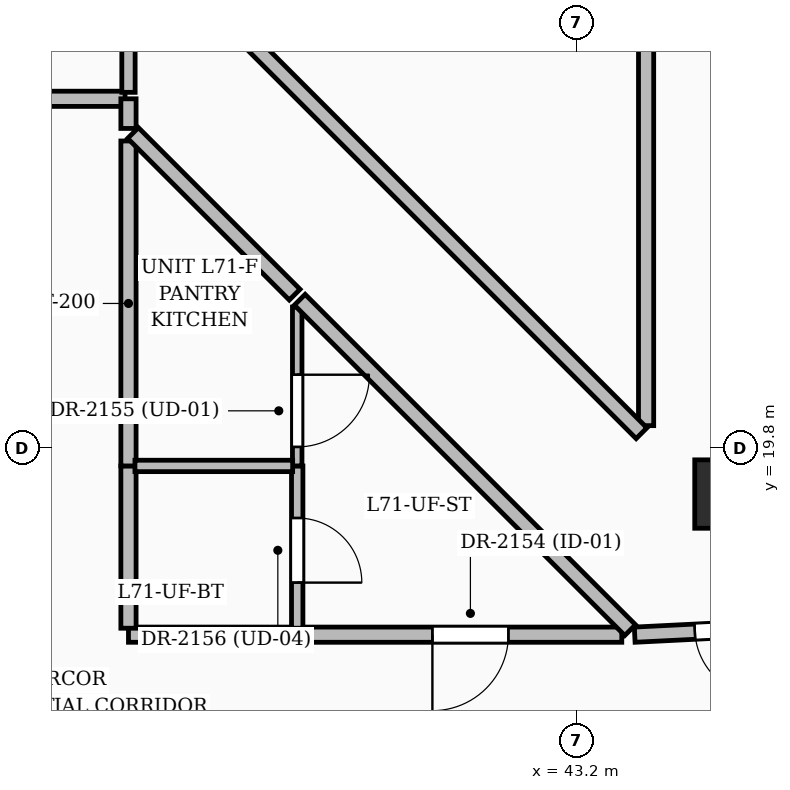
"""IFC4 building model, lengths in metres.
Left out: names, types, materials, properties, quantities, classifications, styles, units other than length and angle.
Written with IfcOpenShell. Run it as: python <this file> out.ifc"""

import sys

from ifc_helpers import new_model, si_unit, direction, frame, frame_2d, origin, origin_2d, place, context, subcontext, project, spatial, rectangle, extrude, element, fill, save


model = new_model("IFC4")
c1 = context("Model", 3, precision=1e-05, world=origin(), true_north=direction((0.0, 1.0)))
c2 = subcontext(c1, "Body", "Model", "MODEL_VIEW")
j1 = project(units=[si_unit("LENGTHUNIT", "METRE"), si_unit("PLANEANGLEUNIT", "RADIAN")], contexts=[c1])
p1 = place(None, origin())
s1 = spatial("IfcSite", under=j1, at=p1, CompositionType="ELEMENT")
p2 = place(p1, origin())
s2 = spatial("IfcBuilding", under=s1, at=p2, CompositionType="ELEMENT")
p3 = place(p2, frame((0.0, 0.0, 274.5)))
s3 = spatial("IfcBuildingStorey", under=s2, at=p3, CompositionType="ELEMENT", Elevation=274.5)
p4 = place(p3, frame((45.2, 19.2, 0.0), z_axis=(0.0, 0.0, 1.0), x_axis=(1.0, 0.0, 0.0)))
e1 = element("IfcColumn", 1, at=p4, inside=s3, PredefinedType="COLUMN", context=c2, shape_type="SweptSolid", body=[
    extrude(rectangle(XDim=0.9, YDim=0.9, at=origin_2d()), origin(), (0.0, 0.0, 1.0), 3.75),
])
p5 = place(p3, frame((44.178, 29.5, 0.0), z_axis=(0.0, 0.0, 1.0), x_axis=(0.441250379224, -0.897384033084, 0.0)))
e2 = element("IfcWall", 2, at=p5, inside=s3, PredefinedType="SOLIDWALL", context=c2, shape_type="SweptSolid", body=[
    extrude(rectangle(XDim=5.676, YDim=0.3, at=frame_2d((2.838, 0.0))), origin(), (0.0, 0.0, 1.0), 3.5),
])
p6 = place(p5, frame((2.298, 0.0, 0.0)))
e3 = element("IfcOpeningElement", 3, at=p6, cuts=e2, PredefinedType="OPENING", context=c2, shape_type="SweptSolid", body=[
    extrude(rectangle(XDim=1.0, YDim=2.2, at=frame_2d((0.5, 1.1))), frame((0.0, 0.16, 0.0), z_axis=(0.0, -1.0, 0.0), x_axis=(1.0, 0.0, 0.0)), (0.0, 0.0, 1.0), 0.32),
])
p7 = place(p3, frame((43.79, 17.35, 0.0), z_axis=(0.0, 0.0, 1.0), x_axis=(-1.0, 0.0, 0.0)))
e4 = element("IfcWall", 4, at=p7, inside=s3, PredefinedType="PARTITIONING", context=c2, shape_type="SweptSolid", body=[
    extrude(rectangle(XDim=4.27, YDim=0.2, at=frame_2d((2.135, 0.0))), origin(), (0.0, 0.0, 1.0), 3.5),
])
p8 = place(p7, frame((1.491, 0.0, 0.0)))
e5 = element("IfcOpeningElement", 5, at=p8, cuts=e4, PredefinedType="OPENING", context=c2, shape_type="SweptSolid", body=[
    extrude(rectangle(XDim=1.0, YDim=2.2, at=frame_2d((0.5, 1.1))), frame((0.0, 0.11, 0.0), z_axis=(0.0, -1.0, 0.0), x_axis=(1.0, 0.0, 0.0)), (0.0, 0.0, 1.0), 0.22),
])
p9 = place(p3, frame((39.52, 17.35, 0.0), z_axis=(0.0, 0.0, 1.0), x_axis=(-1.0, 0.0, 0.0)))
e6 = element("IfcWall", 6, at=p9, inside=s3, PredefinedType="PARTITIONING", context=c2, shape_type="SweptSolid", body=[
    extrude(rectangle(XDim=2.22, YDim=0.2, at=frame_2d((1.11, 0.0))), origin(), (0.0, 0.0, 1.0), 3.5),
])
p10 = place(p3, frame((37.3, 17.435, 0.0), z_axis=(0.0, 0.0, 1.0), x_axis=(0.0, 1.0, 0.0)))
e7 = element("IfcWall", 7, at=p10, inside=s3, PredefinedType="PARTITIONING", context=c2, shape_type="SweptSolid", body=[
    extrude(rectangle(XDim=2.135, YDim=0.2, at=frame_2d((1.067, 0.0))), origin(), (0.0, 0.0, 1.0), 3.5),
])
p11 = place(p3, frame((37.3, 19.57, 0.0), z_axis=(0.0, 0.0, 1.0), x_axis=(0.0, 1.0, 0.0)))
e8 = element("IfcWall", 8, at=p11, inside=s3, PredefinedType="PARTITIONING", context=c2, shape_type="SweptSolid", body=[
    extrude(rectangle(XDim=4.275, YDim=0.2, at=frame_2d((2.137, 0.0))), origin(), (0.0, 0.0, 1.0), 3.5),
])
p12 = place(p3, frame((37.255, 24.4, 0.0), z_axis=(0.0, 0.0, 1.0), x_axis=(-1.0, 0.0, 0.0)))
e9 = element("IfcWall", 9, at=p12, inside=s3, PredefinedType="PARTITIONING", context=c2, shape_type="SweptSolid", body=[
    extrude(rectangle(XDim=1.905, YDim=0.2, at=frame_2d((0.952, 0.0))), origin(), (0.0, 0.0, 1.0), 2.685),
])
p13 = place(p3, frame((37.3, 24.01, 0.0), z_axis=(0.0, 0.0, 1.0), x_axis=(0.0, 1.0, 0.0)))
e10 = element("IfcWall", 10, at=p13, inside=s3, PredefinedType="PARTITIONING", context=c2, shape_type="SweptSolid", body=[
    extrude(rectangle(XDim=0.39, YDim=0.2, at=frame_2d((0.195, 0.0))), origin(), (0.0, 0.0, 1.0), 3.5),
])
p14 = place(p3, frame((47.41, 17.522, 0.0), z_axis=(0.0, 0.0, 1.0), x_axis=(-0.998761311764, -0.049757834795, 0.0)))
e11 = element("IfcWall", 11, at=p14, inside=s3, PredefinedType="PARTITIONING", context=c2, shape_type="SweptSolid", body=[
    extrude(rectangle(XDim=3.454, YDim=0.2, at=frame_2d((1.727, 0.0))), origin(), (0.0, 0.0, 1.0), 2.685),
])
p15 = place(p14, frame((1.762, 0.0, 0.0)))
e12 = element("IfcOpeningElement", 12, at=p15, cuts=e11, PredefinedType="OPENING", context=c2, shape_type="SweptSolid", body=[
    extrude(rectangle(XDim=0.9, YDim=2.1, at=frame_2d((0.45, 1.05))), frame((0.0, 0.11, 0.0), z_axis=(0.0, -1.0, 0.0), x_axis=(1.0, 0.0, 0.0)), (0.0, 0.0, 1.0), 0.22),
])
p16 = place(p3, frame((39.52, 19.57, 0.0), z_axis=(0.0, 0.0, 1.0), x_axis=(0.0, -1.0, 0.0)))
e13 = element("IfcWall", 13, at=p16, inside=s3, PredefinedType="PARTITIONING", context=c2, shape_type="SweptSolid", body=[
    extrude(rectangle(XDim=2.135, YDim=0.15, at=frame_2d((1.067, 0.0))), origin(), (0.0, 0.0, 1.0), 3.5),
])
p17 = place(p16, frame((0.685, 0.0, 0.0)))
e14 = element("IfcOpeningElement", 14, at=p17, cuts=e13, PredefinedType="OPENING", context=c2, shape_type="SweptSolid", body=[
    extrude(rectangle(XDim=0.85, YDim=2.1, at=frame_2d((0.425, 1.05))), frame((0.0, 0.085, 0.0), z_axis=(0.0, -1.0, 0.0), x_axis=(1.0, 0.0, 0.0)), (0.0, 0.0, 1.0), 0.17),
])
p18 = place(p3, frame((39.52, 21.66, 0.0), z_axis=(0.0, 0.0, 1.0), x_axis=(0.0, -1.0, 0.0)))
e15 = element("IfcWall", 15, at=p18, inside=s3, PredefinedType="PARTITIONING", context=c2, shape_type="SweptSolid", body=[
    extrude(rectangle(XDim=2.09, YDim=0.125, at=frame_2d((1.045, 0.0))), origin(), (0.0, 0.0, 1.0), 3.5),
])
p19 = place(p18, frame((0.89, 0.0, 0.0)))
e16 = element("IfcOpeningElement", 16, at=p19, cuts=e15, PredefinedType="OPENING", context=c2, shape_type="SweptSolid", body=[
    extrude(rectangle(XDim=0.95, YDim=2.2, at=frame_2d((0.475, 1.1))), frame((0.0, 0.072, 0.0), z_axis=(0.0, -1.0, 0.0), x_axis=(1.0, 0.0, 0.0)), (0.0, 0.0, 1.0), 0.145),
])
p20 = place(p3, frame((43.9, 17.41, 0.0), z_axis=(0.0, 0.0, 1.0), x_axis=(-0.707106781187, 0.707106781187, 0.0)))
e17 = element("IfcWall", 17, at=p20, inside=s3, PredefinedType="PARTITIONING", context=c2, shape_type="SweptSolid", body=[
    extrude(rectangle(XDim=6.146, YDim=0.2, at=frame_2d((3.073, 0.0))), origin(), (0.0, 0.0, 1.0), 3.5),
])
p21 = place(p3, frame((39.46, 19.57, 0.0), z_axis=(0.0, 0.0, 1.0), x_axis=(-1.0, 0.0, 0.0)))
e18 = element("IfcWall", 18, at=p21, inside=s3, PredefinedType="PARTITIONING", context=c2, shape_type="SweptSolid", body=[
    extrude(rectangle(XDim=2.075, YDim=0.15, at=frame_2d((1.038, 0.0))), origin(), (0.0, 0.0, 1.0), 3.5),
])
p22 = place(p3, frame((39.486, 21.823, 0.0), z_axis=(0.0, 0.0, 1.0), x_axis=(-0.707066186027, 0.707147374015, 0.0)))
e19 = element("IfcWall", 19, at=p22, inside=s3, PredefinedType="PARTITIONING", context=c2, shape_type="SweptSolid", body=[
    extrude(rectangle(XDim=3.007, YDim=0.2, at=frame_2d((1.503, 0.0))), origin(), (0.0, 0.0, 1.0), 3.5),
])
p23 = place(p3, frame((44.11, 25.98, 0.0), z_axis=(0.0, 0.0, 1.0), x_axis=(0.0, -1.0, 0.0)))
e20 = element("IfcWall", 20, at=p23, inside=s3, PredefinedType="PARTITIONING", context=c2, shape_type="SweptSolid", body=[
    extrude(rectangle(XDim=5.88, YDim=0.2, at=frame_2d((2.94, 0.0))), origin(), (0.0, 0.0, 1.0), 2.685),
])
p24 = place(p3, frame((37.3, 24.485, 0.0), z_axis=(0.0, 0.0, 1.0), x_axis=(0.0, 1.0, 0.0)))
e21 = element("IfcWall", 21, at=p24, inside=s3, PredefinedType="PARTITIONING", context=c2, shape_type="SweptSolid", body=[
    extrude(rectangle(XDim=2.115, YDim=0.175, at=frame_2d((1.058, 0.0))), origin(), (0.0, 0.0, 1.0), 2.685),
])
p25 = place(p3, frame((44.05, 20.0, 0.0), z_axis=(0.0, 0.0, 1.0), x_axis=(-0.707093895296, 0.707119666842, 0.0)))
e22 = element("IfcWall", 22, at=p25, inside=s3, PredefinedType="PARTITIONING", context=c2, shape_type="SweptSolid", body=[
    extrude(rectangle(XDim=9.473, YDim=0.2, at=frame_2d((4.737, 0.0))), origin(), (0.0, 0.0, 1.0), 2.685),
])
p26 = place(p15, origin())
e23 = element("IfcDoor", 23, at=p26, inside=s3, OperationType="SINGLE_SWING_LEFT", PredefinedType="DOOR", context=c2, shape_type="SweptSolid", body=[
    extrude(rectangle(XDim=0.9, YDim=2.1, at=frame_2d((0.45, 1.05))), frame((0.0, 0.025, 0.0), z_axis=(0.0, -1.0, 0.0), x_axis=(1.0, 0.0, 0.0)), (0.0, 0.0, 1.0), 0.05),
])
fill(e12, e23)
p27 = place(p8, origin())
e24 = element("IfcDoor", 24, at=p27, inside=s3, OperationType="SINGLE_SWING_RIGHT", PredefinedType="DOOR", context=c2, shape_type="SweptSolid", body=[
    extrude(rectangle(XDim=1.0, YDim=2.2, at=frame_2d((0.5, 1.1))), frame((0.0, 0.025, 0.0), z_axis=(0.0, -1.0, 0.0), x_axis=(1.0, 0.0, 0.0)), (0.0, 0.0, 1.0), 0.05),
])
fill(e5, e24)
p28 = place(p19, origin())
e25 = element("IfcDoor", 25, at=p28, inside=s3, OperationType="SINGLE_SWING_LEFT", PredefinedType="DOOR", context=c2, shape_type="SweptSolid", body=[
    extrude(rectangle(XDim=0.95, YDim=2.2, at=frame_2d((0.475, 1.1))), frame((0.0, 0.025, 0.0), z_axis=(0.0, -1.0, 0.0), x_axis=(1.0, 0.0, 0.0)), (0.0, 0.0, 1.0), 0.05),
])
fill(e16, e25)
p29 = place(p17, origin())
e26 = element("IfcDoor", 26, at=p29, inside=s3, OperationType="SINGLE_SWING_RIGHT", PredefinedType="DOOR", context=c2, shape_type="SweptSolid", body=[
    extrude(rectangle(XDim=0.85, YDim=2.1, at=frame_2d((0.425, 1.05))), frame((0.0, 0.025, 0.0), z_axis=(0.0, -1.0, 0.0), x_axis=(1.0, 0.0, 0.0)), (0.0, 0.0, 1.0), 0.05),
])
fill(e14, e26)
save(model, sys.argv[1])
